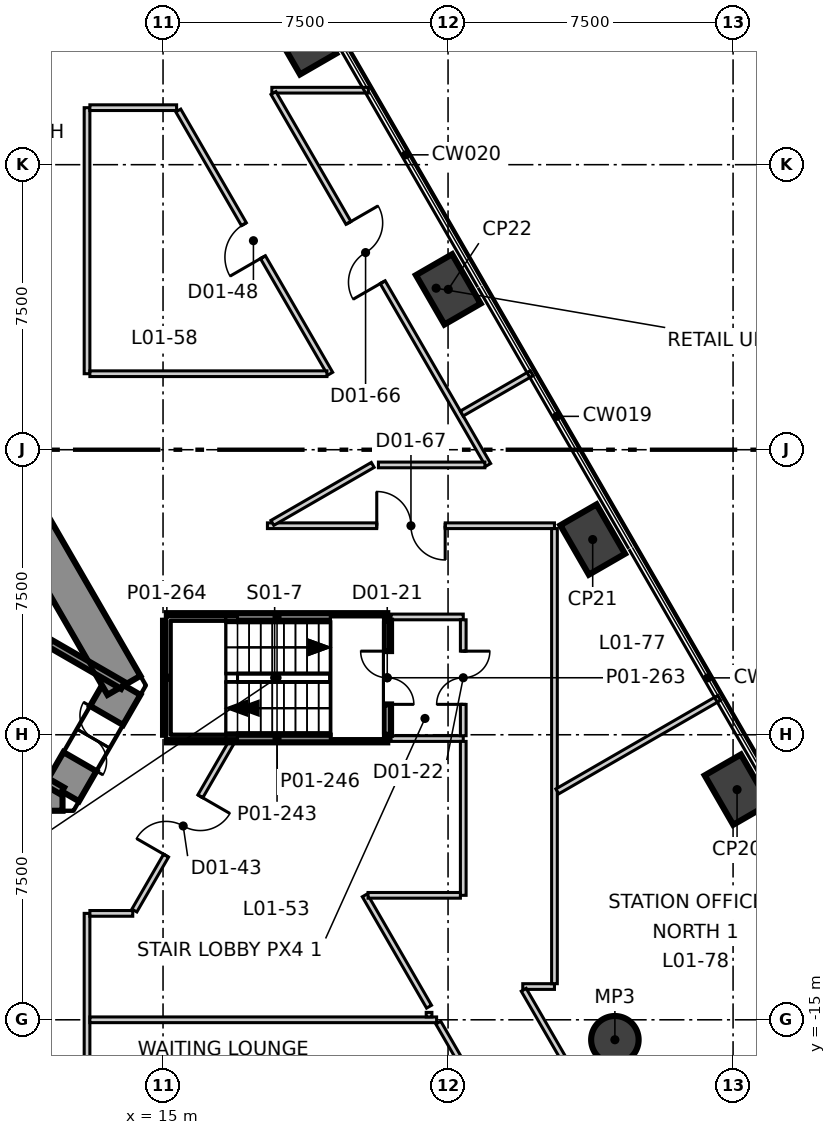
"""IFC4 building model, lengths in metres.
Left out: names, types, materials, properties, quantities, classifications, styles, units other than length and angle.
Written with IfcOpenShell. Run it as: python <this file> out.ifc"""

import sys

from ifc_helpers import new_model, si_unit, direction, frame, frame_2d, origin, origin_2d, place, context, subcontext, project, spatial, polyline, rectangle, circle, outline, extrude, element, fill, save


model = new_model("IFC4")
c1 = context("Model", 3, precision=1e-05, world=origin(), true_north=direction((0.0, 1.0)))
c2 = subcontext(c1, "Body", "Model", "MODEL_VIEW")
j1 = project(units=[si_unit("LENGTHUNIT", "METRE"), si_unit("PLANEANGLEUNIT", "RADIAN")], contexts=[c1])
p1 = place(None, origin())
s1 = spatial("IfcSite", under=j1, at=p1, CompositionType="ELEMENT")
p2 = place(p1, origin())
s2 = spatial("IfcBuilding", under=s1, at=p2, CompositionType="ELEMENT")
p3 = place(p2, frame((0.0, 0.0, 8.5)))
s3 = spatial("IfcBuildingStorey", under=s2, at=p3, CompositionType="ELEMENT", Elevation=8.5)
p4 = place(p3, frame((-12.355, -9.0, -0.4), z_axis=(0.0, 0.0, 1.0), x_axis=(1.0, 0.0, 0.0)))
e1 = element("IfcWall", 1, at=p4, inside=s3, PredefinedType="SHEAR", context=c2, shape_type="SweptSolid", body=[
    extrude(outline(polyline([(-0.289, -0.5), (1.656, -0.5), (3.601, -0.5), (5.547, -0.5), (7.492, -0.5), (9.437, -0.5), (11.382, -0.5), (13.328, -0.5), (15.273, -0.5), (17.218, -0.5), (19.163, -0.5), (21.109, -0.5), (23.054, -0.5), (24.999, -0.5), (24.422, 0.5), (22.566, 0.5), (20.709, 0.5), (18.853, 0.5), (16.996, 0.5), (15.14, 0.5), (13.283, 0.5), (11.427, 0.5), (9.57, 0.5), (7.714, 0.5), (5.857, 0.5), (4.001, 0.5), (2.145, 0.5), (0.288, 0.5), (-0.289, -0.5)])), origin(), (0.0, 0.0, 1.0), 6.0),
])
p5 = place(p3, frame((12.355, -9.0, -0.4), z_axis=(0.0, 0.0, 1.0), x_axis=(0.500077567175, 0.865980615723, 0.0)))
e2 = element("IfcWall", 2, at=p5, inside=s3, PredefinedType="SHEAR", context=c2, shape_type="SweptSolid", body=[
    extrude(outline(polyline([(-0.288, -0.5), (1.617, -0.5), (3.522, -0.5), (2.945, 0.5), (1.617, 0.5), (0.289, 0.499), (-0.288, -0.5)])), origin(), (0.0, 0.0, 1.0), 6.0),
])
p6 = place(p5, frame((0.917, 0.0, 0.4)))
e3 = element("IfcOpeningElement", 3, at=p6, cuts=e2, PredefinedType="OPENING", context=c2, shape_type="SweptSolid", body=[
    extrude(rectangle(XDim=1.4, YDim=2.1, at=frame_2d((0.7, 1.05))), frame((0.0, 0.51, 0.0), z_axis=(0.0, -1.0, 0.0), x_axis=(1.0, 0.0, 0.0)), (0.0, 0.0, 1.0), 1.02),
])
p7 = place(p3, frame((13.972, -6.2, -0.4), z_axis=(0.0, 0.0, 1.0), x_axis=(-0.499992141631, 0.866029940768, 0.0)))
e4 = element("IfcWall", 4, at=p7, inside=s3, PredefinedType="SHEAR", context=c2, shape_type="SweptSolid", body=[
    extrude(outline(polyline([(-0.288, -0.5), (1.657, -0.5), (3.602, -0.5), (5.547, -0.5), (7.493, -0.5), (9.438, -0.5), (11.383, -0.5), (13.328, -0.5), (15.273, -0.5), (17.218, -0.499), (19.164, -0.499), (21.109, -0.499), (23.054, -0.499), (24.999, -0.499), (24.422, 0.5), (22.566, 0.5), (20.709, 0.5), (18.853, 0.5), (16.996, 0.5), (15.14, 0.5), (13.283, 0.5), (11.427, 0.5), (9.57, 0.5), (7.714, 0.5), (5.857, 0.5), (4.001, 0.5), (2.145, 0.5), (0.288, 0.5), (-0.288, -0.5)])), origin(), (0.0, 0.0, 1.0), 6.0),
])
p8 = place(p7, frame((11.455, 0.0, 0.4)))
e5 = element("IfcOpeningElement", 5, at=p8, cuts=e4, PredefinedType="OPENING", context=c2, shape_type="SweptSolid", body=[
    extrude(rectangle(XDim=1.8, YDim=2.1, at=frame_2d((0.9, 1.05))), frame((0.0, 0.51, 0.0), z_axis=(0.0, -1.0, 0.0), x_axis=(1.0, 0.0, 0.0)), (0.0, 0.0, 1.0), 1.02),
])
for number, where, z_axis, x_axis in (
    (6, (30.105, -8.944, -0.4), (0.0, 0.0, 1.0), (-0.5, 0.866, 0.0)),
    (7, (26.306, -2.363, -0.4), (0.0, 0.0, 1.0), (-0.5, 0.866, 0.0)),
    (8, (22.506, 4.219, -0.4), (0.0, 0.0, 1.0), (-0.5, 0.866, 0.0)),
    (9, (18.706, 10.8, -0.4), (0.0, 0.0, 1.0), (-0.5, 0.866, 0.0)),
):
    element("IfcColumn", number, at=place(p3, frame(where, z_axis=z_axis, x_axis=x_axis)), inside=s3, PredefinedType="COLUMN", context=c2, shape_type="SweptSolid", body=[
        extrude(rectangle(XDim=1.5, YDim=1.1, at=origin_2d()), origin(), (0.0, 0.0, 1.0), 6.0),
    ])
p9 = place(p3, frame((26.89, -15.525, -0.4), z_axis=(0.0, 0.0, 1.0), x_axis=(1.0, 0.0, 0.0)))
e10 = element("IfcColumn", 10, at=p9, inside=s3, PredefinedType="COLUMN", context=c2, shape_type="SweptSolid", body=[
    extrude(circle(Radius=0.625, at=origin_2d()), origin(), (0.0, 0.0, 1.0), 6.0),
])
for number, where, z_axis, x_axis in (
    (11, (21.0, -7.6, 0.0), (0.0, 0.0, 1.0), (1.0, 0.0, 0.0)),
    (12, (21.0, -4.4, 0.0), (0.0, 0.0, 1.0), (1.0, 0.0, 0.0)),
):
    element("IfcWall", number, at=place(p3, frame(where, z_axis=z_axis, x_axis=x_axis)), inside=s3, PredefinedType="PARTITIONING", context=c2, shape_type="SweptSolid", body=[
        extrude(rectangle(XDim=1.9, YDim=0.15, at=frame_2d((0.95, 0.0))), origin(), (0.0, 0.0, 1.0), 5.6),
    ])
p10 = place(p3, frame((22.9, -7.525, 0.0), z_axis=(0.0, 0.0, 1.0), x_axis=(0.0, 1.0, 0.0)))
e13 = element("IfcWall", 13, at=p10, inside=s3, PredefinedType="PARTITIONING", context=c2, shape_type="SweptSolid", body=[
    extrude(rectangle(XDim=3.05, YDim=0.15, at=frame_2d((1.525, 0.0))), origin(), (0.0, 0.0, 1.0), 5.6),
])
p11 = place(p10, frame((0.825, 0.0, 0.0)))
e14 = element("IfcOpeningElement", 14, at=p11, cuts=e13, PredefinedType="OPENING", context=c2, shape_type="SweptSolid", body=[
    extrude(rectangle(XDim=1.4, YDim=2.1, at=frame_2d((0.7, 1.05))), frame((0.0, 0.085, 0.0), z_axis=(0.0, -1.0, 0.0), x_axis=(1.0, 0.0, 0.0)), (0.0, 0.0, 1.0), 0.17),
])
p12 = place(p3, frame((24.466, -14.125, 0.0), z_axis=(0.0, 0.0, 1.0), x_axis=(1.0, 0.0, 0.0)))
e15 = element("IfcWall", 15, at=p12, inside=s3, PredefinedType="PARTITIONING", context=c2, shape_type="SweptSolid", body=[
    extrude(rectangle(XDim=0.834, YDim=0.15, at=frame_2d((0.417, 0.0))), origin(), (0.0, 0.0, 1.0), 5.6),
])
p13 = place(p3, frame((17.863, 9.46, 0.0), z_axis=(0.0, 0.0, 1.0), x_axis=(1.0, 0.0, 0.0)))
e16 = element("IfcWall", 16, at=p13, inside=s3, PredefinedType="PARTITIONING", context=c2, shape_type="SweptSolid", body=[
    extrude(rectangle(XDim=2.54, YDim=0.15, at=frame_2d((1.27, 0.0))), origin(), (0.0, 0.0, 1.0), 5.6),
])
p14 = place(p3, frame((17.747, -2.0, 0.0), z_axis=(0.0, 0.0, 1.0), x_axis=(1.0, 0.0, 0.0)))
e17 = element("IfcWall", 17, at=p14, inside=s3, PredefinedType="PARTITIONING", context=c2, shape_type="SweptSolid", body=[
    extrude(rectangle(XDim=7.553, YDim=0.15, at=frame_2d((3.776, 0.0))), origin(), (0.0, 0.0, 1.0), 5.0),
])
p15 = place(p14, frame((2.877, 0.0, 0.0)))
e18 = element("IfcOpeningElement", 18, at=p15, cuts=e17, PredefinedType="OPENING", context=c2, shape_type="SweptSolid", body=[
    extrude(rectangle(XDim=1.8, YDim=2.1, at=frame_2d((0.9, 1.05))), frame((0.0, 0.085, 0.0), z_axis=(0.0, -1.0, 0.0), x_axis=(1.0, 0.0, 0.0)), (0.0, 0.0, 1.0), 0.17),
])
p16 = place(p3, frame((13.0, -22.425, 0.0), z_axis=(0.0, 0.0, 1.0), x_axis=(0.0, 1.0, 0.0)))
e19 = element("IfcWall", 19, at=p16, inside=s3, PredefinedType="PARTITIONING", context=c2, shape_type="SweptSolid", body=[
    extrude(rectangle(XDim=10.225, YDim=0.15, at=frame_2d((5.113, 0.0))), origin(), (0.0, 0.0, 1.0), 5.6),
])
p17 = place(p16, frame((2.475, 0.0, 0.0)))
e20 = element("IfcOpeningElement", 20, at=p17, cuts=e19, PredefinedType="OPENING", context=c2, shape_type="SweptSolid", body=[
    extrude(rectangle(XDim=2.4, YDim=2.1, at=frame_2d((1.2, 1.05))), frame((0.0, 0.085, 0.0), z_axis=(0.0, -1.0, 0.0), x_axis=(1.0, 0.0, 0.0)), (0.0, 0.0, 1.0), 0.17),
])
p18 = place(p3, frame((13.0, 2.0, 0.0), z_axis=(0.0, 0.0, 1.0), x_axis=(0.0, 1.0, 0.0)))
e21 = element("IfcWall", 21, at=p18, inside=s3, PredefinedType="PARTITIONING", context=c2, shape_type="SweptSolid", body=[
    extrude(rectangle(XDim=7.0, YDim=0.15, at=frame_2d((3.5, 0.0))), origin(), (0.0, 0.0, 1.0), 5.6),
])
p19 = place(p3, frame((13.075, -15.0, 0.0), z_axis=(0.0, 0.0, 1.0), x_axis=(1.0, 0.0, 0.0)))
e22 = element("IfcWall", 22, at=p19, inside=s3, PredefinedType="PARTITIONING", context=c2, shape_type="SweptSolid", body=[
    extrude(rectangle(XDim=9.124, YDim=0.15, at=frame_2d((4.562, 0.0))), origin(), (0.0, 0.0, 1.0), 5.6),
])
p20 = place(p3, frame((13.075, -12.2, 0.0), z_axis=(0.0, 0.0, 1.0), x_axis=(1.0, 0.0, 0.0)))
e23 = element("IfcWall", 23, at=p20, inside=s3, PredefinedType="PARTITIONING", context=c2, shape_type="SweptSolid", body=[
    extrude(rectangle(XDim=1.128, YDim=0.15, at=frame_2d((0.564, 0.0))), origin(), (0.0, 0.0, 1.0), 5.6),
])
p21 = place(p3, frame((14.246, -12.125, 0.0), z_axis=(0.0, 0.0, 1.0), x_axis=(0.500018862428, 0.866014513283, 0.0)))
e24 = element("IfcWall", 24, at=p21, inside=s3, PredefinedType="PARTITIONING", context=c2, shape_type="SweptSolid", body=[
    extrude(rectangle(XDim=5.11, YDim=0.15, at=frame_2d((2.555, 0.0))), origin(), (0.0, 0.0, 1.0), 5.6),
])
p22 = place(p21, frame((1.669, 0.0, 0.0)))
e25 = element("IfcOpeningElement", 25, at=p22, cuts=e24, PredefinedType="OPENING", context=c2, shape_type="SweptSolid", body=[
    extrude(rectangle(XDim=1.8, YDim=2.1, at=frame_2d((0.9, 1.05))), frame((0.0, 0.085, 0.0), z_axis=(0.0, -1.0, 0.0), x_axis=(1.0, 0.0, 0.0)), (0.0, 0.0, 1.0), 0.17),
])
p23 = place(p3, frame((20.309, -11.725, 0.0), z_axis=(0.0, 0.0, 1.0), x_axis=(0.499849486556, -0.866112285324, 0.0)))
e26 = element("IfcWall", 26, at=p23, inside=s3, PredefinedType="PARTITIONING", context=c2, shape_type="SweptSolid", body=[
    extrude(rectangle(XDim=3.383, YDim=0.15, at=frame_2d((1.691, 0.0))), origin(), (0.0, 0.0, 1.0), 5.6),
])
p24 = place(p3, frame((22.243, -15.075, 0.0), z_axis=(0.0, 0.0, 1.0), x_axis=(0.499995765644, -0.866027848477, 0.0)))
e27 = element("IfcWall", 27, at=p24, inside=s3, PredefinedType="PARTITIONING", context=c2, shape_type="SweptSolid", body=[
    extrude(rectangle(XDim=3.608, YDim=0.15, at=frame_2d((1.804, 0.0))), origin(), (0.0, 0.0, 1.0), 5.6),
])
p25 = place(p3, frame((17.906, 9.385, 0.0), z_axis=(0.0, 0.0, 1.0), x_axis=(0.500038545404, -0.866003148442, 0.0)))
e28 = element("IfcWall", 28, at=p25, inside=s3, PredefinedType="PARTITIONING", context=c2, shape_type="SweptSolid", body=[
    extrude(rectangle(XDim=11.299, YDim=0.15, at=frame_2d((5.649, 0.0))), origin(), (0.0, 0.0, 1.0), 5.6),
])
p26 = place(p25, frame((3.947, 0.0, 0.0)))
e29 = element("IfcOpeningElement", 29, at=p26, cuts=e28, PredefinedType="OPENING", context=c2, shape_type="SweptSolid", body=[
    extrude(rectangle(XDim=1.8, YDim=2.1, at=frame_2d((0.9, 1.05))), frame((0.0, 0.085, 0.0), z_axis=(0.0, -1.0, 0.0), x_axis=(1.0, 0.0, 0.0)), (0.0, 0.0, 1.0), 0.17),
])
p27 = place(p3, frame((22.9, -11.725, 0.0), z_axis=(0.0, 0.0, 1.0), x_axis=(0.0, 1.0, 0.0)))
e30 = element("IfcWall", 30, at=p27, inside=s3, PredefinedType="PARTITIONING", context=c2, shape_type="SweptSolid", body=[
    extrude(rectangle(XDim=4.05, YDim=0.15, at=frame_2d((2.025, 0.0))), origin(), (0.0, 0.0, 1.0), 5.6),
])
p28 = place(p3, frame((20.395, -11.725, 0.0), z_axis=(0.0, 0.0, 1.0), x_axis=(1.0, 0.0, 0.0)))
e31 = element("IfcWall", 31, at=p28, inside=s3, PredefinedType="PARTITIONING", context=c2, shape_type="SweptSolid", body=[
    extrude(rectangle(XDim=2.43, YDim=0.15, at=frame_2d((1.215, 0.0))), origin(), (0.0, 0.0, 1.0), 5.6),
])
p29 = place(p3, frame((22.0, -14.925, 0.0), z_axis=(0.0, 0.0, 1.0), x_axis=(0.0, 1.0, 0.0)))
e32 = element("IfcWall", 32, at=p29, inside=s3, PredefinedType="PARTITIONING", context=c2, shape_type="SweptSolid", body=[
    extrude(rectangle(XDim=0.12, YDim=0.15, at=frame_2d((0.06, 0.0))), origin(), (0.0, 0.0, 1.0), 5.6),
])
p30 = place(p3, frame((17.877, -1.925, 0.0), z_axis=(0.0, 0.0, 1.0), x_axis=(0.865982946147, 0.500073531575, 0.0)))
e33 = element("IfcWall", 33, at=p30, inside=s3, PredefinedType="PARTITIONING", context=c2, shape_type="SweptSolid", body=[
    extrude(rectangle(XDim=3.05, YDim=0.15, at=frame_2d((1.525, 0.0))), origin(), (0.0, 0.0, 1.0), 5.6),
])
p31 = place(p3, frame((22.861, 0.953, 0.0), z_axis=(0.0, 0.0, 1.0), x_axis=(0.866185586049, 0.49972245349, 0.0)))
e34 = element("IfcWall", 34, at=p31, inside=s3, PredefinedType="PARTITIONING", context=c2, shape_type="SweptSolid", body=[
    extrude(rectangle(XDim=2.125, YDim=0.15, at=frame_2d((1.062, 0.0))), origin(), (0.0, 0.0, 1.0), 5.6),
])
p32 = place(p3, frame((25.3, -14.05, 0.0), z_axis=(0.0, 0.0, 1.0), x_axis=(0.0, 1.0, 0.0)))
e35 = element("IfcWall", 35, at=p32, inside=s3, PredefinedType="PARTITIONING", context=c2, shape_type="SweptSolid", body=[
    extrude(rectangle(XDim=11.975, YDim=0.15, at=frame_2d((5.988, 0.0))), origin(), (0.0, 0.0, 1.0), 5.6),
])
p33 = place(p3, frame((20.668, -0.4, 0.0), z_axis=(0.0, 0.0, 1.0), x_axis=(1.0, 0.0, 0.0)))
e36 = element("IfcWall", 36, at=p33, inside=s3, PredefinedType="PARTITIONING", context=c2, shape_type="SweptSolid", body=[
    extrude(rectangle(XDim=2.801, YDim=0.15, at=frame_2d((1.4, 0.0))), origin(), (0.0, 0.0, 1.0), 5.6),
])
p34 = place(p3, frame((25.375, -8.99, 0.0), z_axis=(0.0, 0.0, 1.0), x_axis=(0.865986393087, 0.500067562424, 0.0)))
e37 = element("IfcWall", 37, at=p34, inside=s3, PredefinedType="PARTITIONING", context=c2, shape_type="SweptSolid", body=[
    extrude(rectangle(XDim=4.919, YDim=0.15, at=frame_2d((2.459, 0.0))), origin(), (0.0, 0.0, 1.0), 5.6),
])
p35 = place(p3, frame((24.491, -14.21, 0.0), z_axis=(0.0, 0.0, 1.0), x_axis=(0.499994996542, -0.866028292513, 0.0)))
e38 = element("IfcWall", 38, at=p35, inside=s3, PredefinedType="PARTITIONING", context=c2, shape_type="SweptSolid", body=[
    extrude(rectangle(XDim=9.486, YDim=0.15, at=frame_2d((4.743, 0.0))), origin(), (0.0, 0.0, 1.0), 5.6),
])
p36 = place(p35, frame((7.172, 0.0, 0.0)))
e39 = element("IfcOpeningElement", 39, at=p36, cuts=e38, PredefinedType="OPENING", context=c2, shape_type="SweptSolid", body=[
    extrude(rectangle(XDim=1.0, YDim=2.1, at=frame_2d((0.5, 1.05))), frame((0.0, 0.085, 0.0), z_axis=(0.0, -1.0, 0.0), x_axis=(1.0, 0.0, 0.0)), (0.0, 0.0, 1.0), 0.17),
])
p37 = place(p3, frame((13.075, 9.0, 0.0), z_axis=(0.0, 0.0, 1.0), x_axis=(1.0, 0.0, 0.0)))
e40 = element("IfcWall", 40, at=p37, inside=s3, PredefinedType="PARTITIONING", context=c2, shape_type="SweptSolid", body=[
    extrude(rectangle(XDim=2.282, YDim=0.15, at=frame_2d((1.141, 0.0))), origin(), (0.0, 0.0, 1.0), 5.6),
])
p38 = place(p3, frame((15.401, 8.925, 0.0), z_axis=(0.0, 0.0, 1.0), x_axis=(0.499987625769, -0.866032547932, 0.0)))
e41 = element("IfcWall", 41, at=p38, inside=s3, PredefinedType="PARTITIONING", context=c2, shape_type="SweptSolid", body=[
    extrude(rectangle(XDim=7.996, YDim=0.15, at=frame_2d((3.998, 0.0))), origin(), (0.0, 0.0, 1.0), 5.6),
])
p39 = place(p38, frame((3.455, 0.0, 0.0)))
e42 = element("IfcOpeningElement", 42, at=p39, cuts=e41, PredefinedType="OPENING", context=c2, shape_type="SweptSolid", body=[
    extrude(rectangle(XDim=1.0, YDim=2.1, at=frame_2d((0.5, 1.05))), frame((0.0, 0.085, 0.0), z_axis=(0.0, -1.0, 0.0), x_axis=(1.0, 0.0, 0.0)), (0.0, 0.0, 1.0), 0.17),
])
p40 = place(p3, frame((13.075, 2.0, 0.0), z_axis=(0.0, 0.0, 1.0), x_axis=(1.0, 0.0, 0.0)))
e43 = element("IfcWall", 43, at=p40, inside=s3, PredefinedType="PARTITIONING", context=c2, shape_type="SweptSolid", body=[
    extrude(rectangle(XDim=6.237, YDim=0.15, at=frame_2d((3.119, 0.0))), origin(), (0.0, 0.0, 1.0), 5.05),
])
p41 = place(p3, frame((6.529, -1.922, 0.0), z_axis=(0.0, 0.0, 1.0), x_axis=(0.866036527536, -0.499980732602, 0.0)))
e44 = element("IfcWall", 44, at=p41, inside=s3, PredefinedType="SOLIDWALL", context=c2, shape_type="SweptSolid", body=[
    extrude(rectangle(XDim=8.564, YDim=0.2, at=frame_2d((4.282, 0.0))), origin(), (0.0, 0.0, 1.0), 5.6),
])
p42 = place(p3, frame((4.929, -4.693, 0.0), z_axis=(0.0, 0.0, 1.0), x_axis=(0.865987152174, -0.50006624788, 0.0)))
e45 = element("IfcWall", 45, at=p42, inside=s3, PredefinedType="SOLIDWALL", context=c2, shape_type="SweptSolid", body=[
    extrude(rectangle(XDim=8.565, YDim=0.2, at=frame_2d((4.282, 0.0))), origin(), (0.0, 0.0, 1.0), 5.6),
])
for number, where, z_axis, x_axis in (
    (46, (15.1, -4.4, 0.0), (0.0, 0.0, 1.0), (1.0, 0.0, 0.0)),
    (47, (15.1, -7.6, 0.0), (0.0, 0.0, 1.0), (1.0, 0.0, 0.0)),
):
    element("IfcWall", number, at=place(p3, frame(where, z_axis=z_axis, x_axis=x_axis)), inside=s3, PredefinedType="SOLIDWALL", context=c2, shape_type="SweptSolid", body=[
        extrude(rectangle(XDim=5.8, YDim=0.2, at=frame_2d((2.9, 0.0))), origin(), (0.0, 0.0, 1.0), 5.6),
    ])
p43 = place(p3, frame((20.9, -7.5, 0.0), z_axis=(0.0, 0.0, 1.0), x_axis=(0.0, 1.0, 0.0)))
e48 = element("IfcWall", 48, at=p43, inside=s3, PredefinedType="SOLIDWALL", context=c2, shape_type="SweptSolid", body=[
    extrude(rectangle(XDim=3.0, YDim=0.2, at=frame_2d((1.5, 0.0))), origin(), (0.0, 0.0, 1.0), 5.6),
])
p44 = place(p43, frame((0.8, 0.0, 0.0)))
e49 = element("IfcOpeningElement", 49, at=p44, cuts=e48, PredefinedType="OPENING", context=c2, shape_type="SweptSolid", body=[
    extrude(rectangle(XDim=1.4, YDim=2.1, at=frame_2d((0.7, 1.05))), frame((0.0, 0.11, 0.0), z_axis=(0.0, -1.0, 0.0), x_axis=(1.0, 0.0, 0.0)), (0.0, 0.0, 1.0), 0.22),
])
p45 = place(p3, frame((15.1, -7.5, 0.0), z_axis=(0.0, 0.0, 1.0), x_axis=(0.0, 1.0, 0.0)))
e50 = element("IfcWall", 50, at=p45, inside=s3, PredefinedType="SOLIDWALL", context=c2, shape_type="SweptSolid", body=[
    extrude(rectangle(XDim=3.0, YDim=0.2, at=frame_2d((1.5, 0.0))), origin(), (0.0, 0.0, 1.0), 5.6),
])
p46 = place(p44, origin())
e51 = element("IfcDoor", 51, at=p46, inside=s3, OperationType="DOUBLE_DOOR_SINGLE_SWING", PredefinedType="DOOR", context=c2, shape_type="SweptSolid", body=[
    extrude(rectangle(XDim=1.4, YDim=2.1, at=frame_2d((0.7, 1.05))), frame((0.0, 0.025, 0.0), z_axis=(0.0, -1.0, 0.0), x_axis=(1.0, 0.0, 0.0)), (0.0, 0.0, 1.0), 0.05),
])
fill(e49, e51)
p47 = place(p11, origin())
e52 = element("IfcDoor", 52, at=p47, inside=s3, OperationType="DOUBLE_DOOR_SINGLE_SWING", PredefinedType="DOOR", context=c2, shape_type="SweptSolid", body=[
    extrude(rectangle(XDim=1.4, YDim=2.1, at=frame_2d((0.7, 1.05))), frame((0.0, 0.025, 0.0), z_axis=(0.0, -1.0, 0.0), x_axis=(1.0, 0.0, 0.0)), (0.0, 0.0, 1.0), 0.05),
])
fill(e14, e52)
p48 = place(p22, origin())
e53 = element("IfcDoor", 53, at=p48, inside=s3, OperationType="DOUBLE_DOOR_SINGLE_SWING", PredefinedType="DOOR", context=c2, shape_type="SweptSolid", body=[
    extrude(rectangle(XDim=1.8, YDim=2.1, at=frame_2d((0.9, 1.05))), frame((0.0, 0.025, 0.0), z_axis=(0.0, -1.0, 0.0), x_axis=(1.0, 0.0, 0.0)), (0.0, 0.0, 1.0), 0.05),
])
fill(e25, e53)
p49 = place(p39, origin())
e54 = element("IfcDoor", 54, at=p49, inside=s3, OperationType="SINGLE_SWING_RIGHT", PredefinedType="DOOR", context=c2, shape_type="SweptSolid", body=[
    extrude(rectangle(XDim=1.0, YDim=2.1, at=frame_2d((0.5, 1.05))), frame((0.0, 0.025, 0.0), z_axis=(0.0, -1.0, 0.0), x_axis=(1.0, 0.0, 0.0)), (0.0, 0.0, 1.0), 0.05),
])
fill(e42, e54)
p50 = place(p26, origin())
e55 = element("IfcDoor", 55, at=p50, inside=s3, OperationType="DOUBLE_DOOR_SINGLE_SWING", PredefinedType="DOOR", context=c2, shape_type="SweptSolid", body=[
    extrude(rectangle(XDim=1.8, YDim=2.1, at=frame_2d((0.9, 1.05))), frame((0.0, 0.025, 0.0), z_axis=(0.0, -1.0, 0.0), x_axis=(1.0, 0.0, 0.0)), (0.0, 0.0, 1.0), 0.05),
])
fill(e29, e55)
p51 = place(p15, origin())
e56 = element("IfcDoor", 56, at=p51, inside=s3, OperationType="DOUBLE_DOOR_SINGLE_SWING", PredefinedType="DOOR", context=c2, shape_type="SweptSolid", body=[
    extrude(rectangle(XDim=1.8, YDim=2.1, at=frame_2d((0.9, 1.05))), frame((0.0, 0.025, 0.0), z_axis=(0.0, -1.0, 0.0), x_axis=(1.0, 0.0, 0.0)), (0.0, 0.0, 1.0), 0.05),
])
fill(e18, e56)
p52 = place(p6, origin())
e57 = element("IfcDoor", 57, at=p52, inside=s3, OperationType="DOUBLE_DOOR_SINGLE_SWING", PredefinedType="DOOR", context=c2, shape_type="SweptSolid", body=[
    extrude(rectangle(XDim=1.4, YDim=2.1, at=frame_2d((0.7, 1.05))), frame((0.0, 0.025, 0.0), z_axis=(0.0, -1.0, 0.0), x_axis=(1.0, 0.0, 0.0)), (0.0, 0.0, 1.0), 0.05),
])
fill(e3, e57)
save(model, sys.argv[1])
